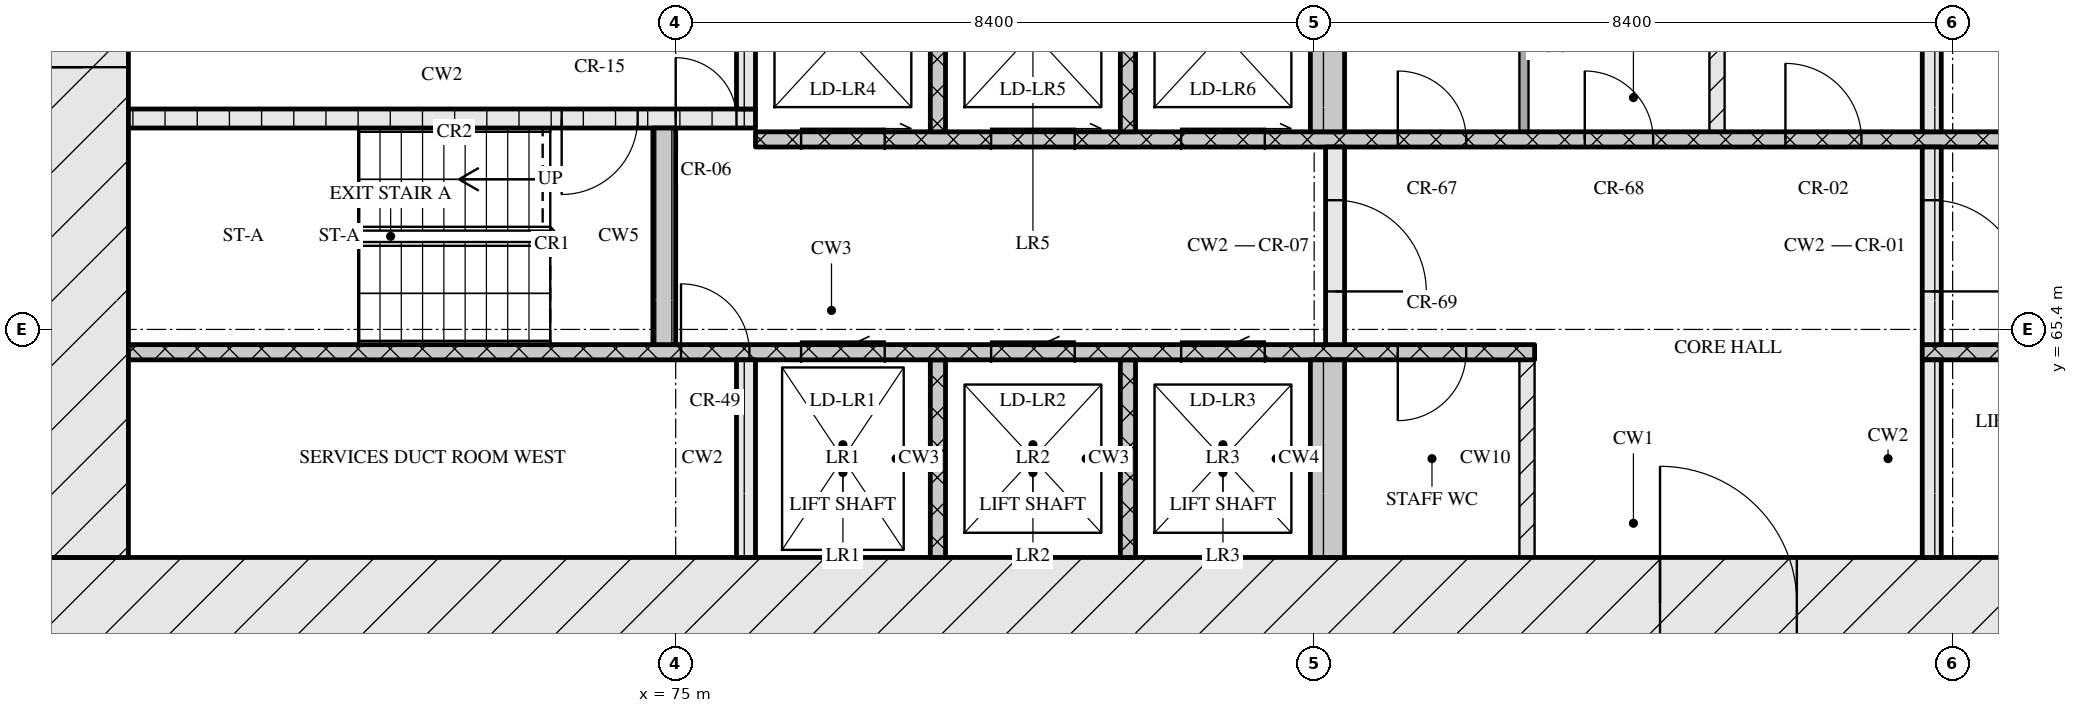
"""IFC4 building model, lengths in metres.
Left out: names, types, materials, properties, quantities, classifications, styles, units other than length and angle.
Written with IfcOpenShell. Run it as: python <this file> out.ifc"""

import sys

from ifc_helpers import new_model, si_unit, direction, frame, frame_2d, origin, place, context, subcontext, project, spatial, rectangle, extrude, element, fill, save


model = new_model("IFC4")
c1 = context("Model", 3, precision=1e-05, world=origin(), true_north=direction((0.0, 1.0)))
c2 = subcontext(c1, "Body", "Model", "MODEL_VIEW")
j1 = project(units=[si_unit("LENGTHUNIT", "METRE"), si_unit("PLANEANGLEUNIT", "RADIAN")], contexts=[c1])
p1 = place(None, origin())
s1 = spatial("IfcSite", under=j1, at=p1, CompositionType="ELEMENT")
p2 = place(p1, origin())
s2 = spatial("IfcBuilding", under=s1, at=p2, CompositionType="ELEMENT")
p3 = place(p2, frame((0.0, 0.0, 62.4)))
s3 = spatial("IfcBuildingStorey", under=s2, at=p3, CompositionType="ELEMENT", Elevation=62.4)
p4 = place(p3, frame((66.6, 61.8, 0.0), z_axis=(0.0, 0.0, 1.0), x_axis=(1.0, 0.0, 0.0)))
e1 = element("IfcWall", 1, at=p4, inside=s3, PredefinedType="SOLIDWALL", context=c2, shape_type="SweptSolid", body=[
    extrude(rectangle(XDim=42.0, YDim=1.2, at=frame_2d((21.0, 0.0))), origin(), (0.0, 0.0, 1.0), 3.32),
])
p5 = place(p4, frame((21.35, 0.0, 0.0)))
e2 = element("IfcOpeningElement", 2, at=p5, cuts=e1, PredefinedType="OPENING", context=c2, shape_type="SweptSolid", body=[
    extrude(rectangle(XDim=1.8, YDim=2.1, at=frame_2d((0.9, 1.05))), frame((0.0, 0.61, 0.0), z_axis=(0.0, -1.0, 0.0), x_axis=(1.0, 0.0, 0.0)), (0.0, 0.0, 1.0), 1.22),
])
p6 = place(p3, frame((67.2, 62.4, 0.0), z_axis=(0.0, 0.0, 1.0), x_axis=(0.0, 1.0, 0.0)))
e3 = element("IfcWall", 3, at=p6, inside=s3, PredefinedType="SOLIDWALL", context=c2, shape_type="SweptSolid", body=[
    extrude(rectangle(XDim=12.0, YDim=1.2, at=frame_2d((6.0, 0.0))), origin(), (0.0, 0.0, 1.0), 3.32),
])
p7 = place(p6, frame((6.45, 0.0, 0.0)))
e4 = element("IfcOpeningElement", 4, at=p7, cuts=e3, PredefinedType="OPENING", context=c2, shape_type="SweptSolid", body=[
    extrude(rectangle(XDim=1.2, YDim=2.1, at=frame_2d((0.6, 1.05))), frame((0.0, 0.61, 0.0), z_axis=(0.0, -1.0, 0.0), x_axis=(1.0, 0.0, 0.0)), (0.0, 0.0, 1.0), 1.22),
])
p8 = place(p3, frame((75.925, 62.4, 0.0), z_axis=(0.0, 0.0, 1.0), x_axis=(0.0, 1.0, 0.0)))
e5 = element("IfcWall", 5, at=p8, inside=s3, PredefinedType="SOLIDWALL", context=c2, shape_type="SweptSolid", body=[
    extrude(rectangle(XDim=2.6, YDim=0.25, at=frame_2d((1.3, 0.0))), origin(), (0.0, 0.0, 1.0), 3.32),
])
for number, where, z_axis, x_axis in (
    (6, (78.45, 62.4, 0.0), (0.0, 0.0, 1.0), (0.0, 1.0, 0.0)),
    (7, (80.95, 62.4, 0.0), (0.0, 0.0, 1.0), (0.0, 1.0, 0.0)),
):
    element("IfcWall", number, at=place(p3, frame(where, z_axis=z_axis, x_axis=x_axis)), inside=s3, PredefinedType="SOLIDWALL", context=c2, shape_type="SweptSolid", body=[
        extrude(rectangle(XDim=2.6, YDim=0.2, at=frame_2d((1.3, 0.0))), origin(), (0.0, 0.0, 1.0), 3.32),
    ])
p9 = place(p3, frame((83.575, 62.4, 0.0), z_axis=(0.0, 0.0, 1.0), x_axis=(0.0, 1.0, 0.0)))
e8 = element("IfcWall", 8, at=p9, inside=s3, PredefinedType="SOLIDWALL", context=c2, shape_type="SweptSolid", body=[
    extrude(rectangle(XDim=2.6, YDim=0.45, at=frame_2d((1.3, 0.0))), origin(), (0.0, 0.0, 1.0), 3.32),
])
p10 = place(p3, frame((86.2, 62.4, 0.0), z_axis=(0.0, 0.0, 1.0), x_axis=(0.0, 1.0, 0.0)))
e9 = element("IfcWall", 9, at=p10, inside=s3, PredefinedType="PARTITIONING", context=c2, shape_type="SweptSolid", body=[
    extrude(rectangle(XDim=2.6, YDim=0.2, at=frame_2d((1.3, 0.0))), origin(), (0.0, 0.0, 1.0), 3.32),
])
p11 = place(p3, frame((91.525, 62.4, 0.0), z_axis=(0.0, 0.0, 1.0), x_axis=(0.0, 1.0, 0.0)))
e10 = element("IfcWall", 10, at=p11, inside=s3, PredefinedType="SOLIDWALL", context=c2, shape_type="SweptSolid", body=[
    extrude(rectangle(XDim=2.6, YDim=0.25, at=frame_2d((1.3, 0.0))), origin(), (0.0, 0.0, 1.0), 3.32),
])
p12 = place(p3, frame((67.8, 65.1, 0.0), z_axis=(0.0, 0.0, 1.0), x_axis=(1.0, 0.0, 0.0)))
e11 = element("IfcWall", 11, at=p12, inside=s3, PredefinedType="SOLIDWALL", context=c2, shape_type="SweptSolid", body=[
    extrude(rectangle(XDim=18.5, YDim=0.2, at=frame_2d((9.25, 0.0))), origin(), (0.0, 0.0, 1.0), 3.32),
])
p13 = place(p12, frame((7.27, 0.0, 0.0)))
e12 = element("IfcOpeningElement", 12, at=p13, cuts=e11, PredefinedType="OPENING", context=c2, shape_type="SweptSolid", body=[
    extrude(rectangle(XDim=0.9, YDim=2.1, at=frame_2d((0.45, 1.05))), frame((0.0, 0.11, 0.0), z_axis=(0.0, -1.0, 0.0), x_axis=(1.0, 0.0, 0.0)), (0.0, 0.0, 1.0), 0.22),
])
p14 = place(p12, frame((8.85, 0.0, 0.0)))
e13 = element("IfcOpeningElement", 13, at=p14, cuts=e11, PredefinedType="OPENING", context=c2, shape_type="SweptSolid", body=[
    extrude(rectangle(XDim=1.1, YDim=2.1, at=frame_2d((0.55, 1.05))), frame((0.0, 0.11, 0.0), z_axis=(0.0, -1.0, 0.0), x_axis=(1.0, 0.0, 0.0)), (0.0, 0.0, 1.0), 0.22),
])
p15 = place(p12, frame((11.35, 0.0, 0.0)))
e14 = element("IfcOpeningElement", 14, at=p15, cuts=e11, PredefinedType="OPENING", context=c2, shape_type="SweptSolid", body=[
    extrude(rectangle(XDim=1.1, YDim=2.1, at=frame_2d((0.55, 1.05))), frame((0.0, 0.11, 0.0), z_axis=(0.0, -1.0, 0.0), x_axis=(1.0, 0.0, 0.0)), (0.0, 0.0, 1.0), 0.22),
])
p16 = place(p12, frame((13.85, 0.0, 0.0)))
e15 = element("IfcOpeningElement", 15, at=p16, cuts=e11, PredefinedType="OPENING", context=c2, shape_type="SweptSolid", body=[
    extrude(rectangle(XDim=1.1, YDim=2.1, at=frame_2d((0.55, 1.05))), frame((0.0, 0.11, 0.0), z_axis=(0.0, -1.0, 0.0), x_axis=(1.0, 0.0, 0.0)), (0.0, 0.0, 1.0), 0.22),
])
p17 = place(p12, frame((16.7, 0.0, 0.0)))
e16 = element("IfcOpeningElement", 16, at=p17, cuts=e11, PredefinedType="OPENING", context=c2, shape_type="SweptSolid", body=[
    extrude(rectangle(XDim=0.9, YDim=2.1, at=frame_2d((0.45, 1.05))), frame((0.0, 0.11, 0.0), z_axis=(0.0, -1.0, 0.0), x_axis=(1.0, 0.0, 0.0)), (0.0, 0.0, 1.0), 0.22),
])
p18 = place(p3, frame((91.4, 65.1, 0.0), z_axis=(0.0, 0.0, 1.0), x_axis=(1.0, 0.0, 0.0)))
e17 = element("IfcWall", 17, at=p18, inside=s3, PredefinedType="SOLIDWALL", context=c2, shape_type="SweptSolid", body=[
    extrude(rectangle(XDim=16.0, YDim=0.2, at=frame_2d((8.0, 0.0))), origin(), (0.0, 0.0, 1.0), 3.32),
])
p19 = place(p18, frame((7.83, 0.0, 0.0)))
e18 = element("IfcOpeningElement", 18, at=p19, cuts=e17, PredefinedType="OPENING", context=c2, shape_type="SweptSolid", body=[
    extrude(rectangle(XDim=0.9, YDim=2.1, at=frame_2d((0.45, 1.05))), frame((0.0, 0.11, 0.0), z_axis=(0.0, -1.0, 0.0), x_axis=(1.0, 0.0, 0.0)), (0.0, 0.0, 1.0), 0.22),
])
p20 = place(p3, frame((74.85, 65.2, 0.0), z_axis=(0.0, 0.0, 1.0), x_axis=(0.0, 1.0, 0.0)))
e19 = element("IfcWall", 19, at=p20, inside=s3, PredefinedType="SOLIDWALL", context=c2, shape_type="SweptSolid", body=[
    extrude(rectangle(XDim=2.85, YDim=0.3, at=frame_2d((1.425, 0.0))), origin(), (0.0, 0.0, 1.0), 3.32),
])
p21 = place(p3, frame((83.675, 65.2, 0.0), z_axis=(0.0, 0.0, 1.0), x_axis=(0.0, 1.0, 0.0)))
e20 = element("IfcWall", 20, at=p21, inside=s3, PredefinedType="SOLIDWALL", context=c2, shape_type="SweptSolid", body=[
    extrude(rectangle(XDim=2.6, YDim=0.25, at=frame_2d((1.3, 0.0))), origin(), (0.0, 0.0, 1.0), 3.32),
])
p22 = place(p21, frame((0.7, 0.0, 0.0)))
e21 = element("IfcOpeningElement", 21, at=p22, cuts=e20, PredefinedType="OPENING", context=c2, shape_type="SweptSolid", body=[
    extrude(rectangle(XDim=1.2, YDim=2.1, at=frame_2d((0.6, 1.05))), frame((0.0, 0.135, 0.0), z_axis=(0.0, -1.0, 0.0), x_axis=(1.0, 0.0, 0.0)), (0.0, 0.0, 1.0), 0.27),
])
p23 = place(p3, frame((91.525, 65.2, 0.0), z_axis=(0.0, 0.0, 1.0), x_axis=(0.0, 1.0, 0.0)))
e22 = element("IfcWall", 22, at=p23, inside=s3, PredefinedType="SOLIDWALL", context=c2, shape_type="SweptSolid", body=[
    extrude(rectangle(XDim=2.6, YDim=0.25, at=frame_2d((1.3, 0.0))), origin(), (0.0, 0.0, 1.0), 3.32),
])
p24 = place(p23, frame((0.7, 0.0, 0.0)))
e23 = element("IfcOpeningElement", 23, at=p24, cuts=e22, PredefinedType="OPENING", context=c2, shape_type="SweptSolid", body=[
    extrude(rectangle(XDim=1.2, YDim=2.1, at=frame_2d((0.6, 1.05))), frame((0.0, 0.135, 0.0), z_axis=(0.0, -1.0, 0.0), x_axis=(1.0, 0.0, 0.0)), (0.0, 0.0, 1.0), 0.27),
])
p25 = place(p3, frame((76.05, 67.9, 0.0), z_axis=(0.0, 0.0, 1.0), x_axis=(1.0, 0.0, 0.0)))
e24 = element("IfcWall", 24, at=p25, inside=s3, PredefinedType="SOLIDWALL", context=c2, shape_type="SweptSolid", body=[
    extrude(rectangle(XDim=23.1, YDim=0.2, at=frame_2d((11.55, 0.0))), origin(), (0.0, 0.0, 1.0), 3.32),
])
p26 = place(p25, frame((0.6, 0.0, 0.0)))
e25 = element("IfcOpeningElement", 25, at=p26, cuts=e24, PredefinedType="OPENING", context=c2, shape_type="SweptSolid", body=[
    extrude(rectangle(XDim=1.1, YDim=2.1, at=frame_2d((0.55, 1.05))), frame((0.0, 0.11, 0.0), z_axis=(0.0, -1.0, 0.0), x_axis=(1.0, 0.0, 0.0)), (0.0, 0.0, 1.0), 0.22),
])
p27 = place(p25, frame((3.1, 0.0, 0.0)))
e26 = element("IfcOpeningElement", 26, at=p27, cuts=e24, PredefinedType="OPENING", context=c2, shape_type="SweptSolid", body=[
    extrude(rectangle(XDim=1.1, YDim=2.1, at=frame_2d((0.55, 1.05))), frame((0.0, 0.11, 0.0), z_axis=(0.0, -1.0, 0.0), x_axis=(1.0, 0.0, 0.0)), (0.0, 0.0, 1.0), 0.22),
])
p28 = place(p25, frame((5.6, 0.0, 0.0)))
e27 = element("IfcOpeningElement", 27, at=p28, cuts=e24, PredefinedType="OPENING", context=c2, shape_type="SweptSolid", body=[
    extrude(rectangle(XDim=1.1, YDim=2.1, at=frame_2d((0.55, 1.05))), frame((0.0, 0.11, 0.0), z_axis=(0.0, -1.0, 0.0), x_axis=(1.0, 0.0, 0.0)), (0.0, 0.0, 1.0), 0.22),
])
p29 = place(p25, frame((8.45, 0.0, 0.0)))
e28 = element("IfcOpeningElement", 28, at=p29, cuts=e24, PredefinedType="OPENING", context=c2, shape_type="SweptSolid", body=[
    extrude(rectangle(XDim=0.9, YDim=2.1, at=frame_2d((0.45, 1.05))), frame((0.0, 0.11, 0.0), z_axis=(0.0, -1.0, 0.0), x_axis=(1.0, 0.0, 0.0)), (0.0, 0.0, 1.0), 0.22),
])
p30 = place(p25, frame((10.91, 0.0, 0.0)))
e29 = element("IfcOpeningElement", 29, at=p30, cuts=e24, PredefinedType="OPENING", context=c2, shape_type="SweptSolid", body=[
    extrude(rectangle(XDim=0.9, YDim=2.1, at=frame_2d((0.45, 1.05))), frame((0.0, 0.11, 0.0), z_axis=(0.0, -1.0, 0.0), x_axis=(1.0, 0.0, 0.0)), (0.0, 0.0, 1.0), 0.22),
])
p31 = place(p25, frame((13.55, 0.0, 0.0)))
e30 = element("IfcOpeningElement", 30, at=p31, cuts=e24, PredefinedType="OPENING", context=c2, shape_type="SweptSolid", body=[
    extrude(rectangle(XDim=1.0, YDim=2.1, at=frame_2d((0.5, 1.05))), frame((0.0, 0.11, 0.0), z_axis=(0.0, -1.0, 0.0), x_axis=(1.0, 0.0, 0.0)), (0.0, 0.0, 1.0), 0.22),
])
for number, where, z_axis, x_axis in (
    (31, (78.45, 68.0, 0.0), (0.0, 0.0, 1.0), (0.0, 1.0, 0.0)),
    (32, (80.95, 68.0, 0.0), (0.0, 0.0, 1.0), (0.0, 1.0, 0.0)),
):
    element("IfcWall", number, at=place(p3, frame(where, z_axis=z_axis, x_axis=x_axis)), inside=s3, PredefinedType="SOLIDWALL", context=c2, shape_type="SweptSolid", body=[
        extrude(rectangle(XDim=2.6, YDim=0.2, at=frame_2d((1.3, 0.0))), origin(), (0.0, 0.0, 1.0), 3.32),
    ])
p32 = place(p3, frame((83.575, 68.0, 0.0), z_axis=(0.0, 0.0, 1.0), x_axis=(0.0, 1.0, 0.0)))
e33 = element("IfcWall", 33, at=p32, inside=s3, PredefinedType="SOLIDWALL", context=c2, shape_type="SweptSolid", body=[
    extrude(rectangle(XDim=2.6, YDim=0.45, at=frame_2d((1.3, 0.0))), origin(), (0.0, 0.0, 1.0), 3.32),
])
p33 = place(p3, frame((86.16, 68.0, 0.0), z_axis=(0.0, 0.0, 1.0), x_axis=(0.0, 1.0, 0.0)))
e34 = element("IfcWall", 34, at=p33, inside=s3, PredefinedType="PARTITIONING", context=c2, shape_type="SweptSolid", body=[
    extrude(rectangle(XDim=2.6, YDim=0.12, at=frame_2d((1.3, 0.0))), origin(), (0.0, 0.0, 1.0), 3.32),
])
p34 = place(p3, frame((88.7, 68.0, 0.0), z_axis=(0.0, 0.0, 1.0), x_axis=(0.0, 1.0, 0.0)))
e35 = element("IfcWall", 35, at=p34, inside=s3, PredefinedType="PARTITIONING", context=c2, shape_type="SweptSolid", body=[
    extrude(rectangle(XDim=2.6, YDim=0.2, at=frame_2d((1.3, 0.0))), origin(), (0.0, 0.0, 1.0), 3.32),
])
p35 = place(p3, frame((91.525, 68.0, 0.0), z_axis=(0.0, 0.0, 1.0), x_axis=(0.0, 1.0, 0.0)))
e36 = element("IfcWall", 36, at=p35, inside=s3, PredefinedType="SOLIDWALL", context=c2, shape_type="SweptSolid", body=[
    extrude(rectangle(XDim=2.6, YDim=0.25, at=frame_2d((1.3, 0.0))), origin(), (0.0, 0.0, 1.0), 3.32),
])
p36 = place(p3, frame((67.8, 68.175, 0.0), z_axis=(0.0, 0.0, 1.0), x_axis=(1.0, 0.0, 0.0)))
e37 = element("IfcWall", 37, at=p36, inside=s3, PredefinedType="SOLIDWALL", context=c2, shape_type="SweptSolid", body=[
    extrude(rectangle(XDim=8.25, YDim=0.25, at=frame_2d((4.125, 0.0))), origin(), (0.0, 0.0, 1.0), 3.32),
])
p37 = place(p36, frame((5.7, 0.0, 0.0)))
e38 = element("IfcOpeningElement", 38, at=p37, cuts=e37, PredefinedType="OPENING", context=c2, shape_type="SweptSolid", body=[
    extrude(rectangle(XDim=1.0, YDim=2.1, at=frame_2d((0.5, 1.05))), frame((0.0, 0.135, 0.0), z_axis=(0.0, -1.0, 0.0), x_axis=(1.0, 0.0, 0.0)), (0.0, 0.0, 1.0), 0.27),
])
p38 = place(p36, frame((7.2, 0.0, 0.0)))
e39 = element("IfcOpeningElement", 39, at=p38, cuts=e37, PredefinedType="OPENING", context=c2, shape_type="SweptSolid", body=[
    extrude(rectangle(XDim=0.8, YDim=2.1, at=frame_2d((0.4, 1.05))), frame((0.0, 0.135, 0.0), z_axis=(0.0, -1.0, 0.0), x_axis=(1.0, 0.0, 0.0)), (0.0, 0.0, 1.0), 0.27),
])
p39 = place(p3, frame((75.925, 68.3, 0.0), z_axis=(0.0, 0.0, 1.0), x_axis=(0.0, 1.0, 0.0)))
e40 = element("IfcWall", 40, at=p39, inside=s3, PredefinedType="SOLIDWALL", context=c2, shape_type="SweptSolid", body=[
    extrude(rectangle(XDim=2.3, YDim=0.25, at=frame_2d((1.15, 0.0))), origin(), (0.0, 0.0, 1.0), 3.32),
])
p40 = place(p5, origin())
e41 = element("IfcDoor", 41, at=p40, inside=s3, OperationType="DOUBLE_DOOR_SINGLE_SWING", PredefinedType="DOOR", context=c2, shape_type="SweptSolid", body=[
    extrude(rectangle(XDim=1.8, YDim=2.1, at=frame_2d((0.9, 1.05))), frame((0.0, 0.025, 0.0), z_axis=(0.0, -1.0, 0.0), x_axis=(1.0, 0.0, 0.0)), (0.0, 0.0, 1.0), 0.05),
])
fill(e2, e41)
p41 = place(p13, origin())
e42 = element("IfcDoor", 42, at=p41, inside=s3, OperationType="SINGLE_SWING_LEFT", PredefinedType="DOOR", context=c2, shape_type="SweptSolid", body=[
    extrude(rectangle(XDim=0.9, YDim=2.1, at=frame_2d((0.45, 1.05))), frame((0.0, 0.025, 0.0), z_axis=(0.0, -1.0, 0.0), x_axis=(1.0, 0.0, 0.0)), (0.0, 0.0, 1.0), 0.05),
])
fill(e12, e42)
p42 = place(p14, origin())
e43 = element("IfcDoor", 43, at=p42, inside=s3, OperationType="SLIDING_TO_LEFT", PredefinedType="DOOR", context=c2, shape_type="SweptSolid", body=[
    extrude(rectangle(XDim=1.1, YDim=2.1, at=frame_2d((0.55, 1.05))), frame((0.0, 0.025, 0.0), z_axis=(0.0, -1.0, 0.0), x_axis=(1.0, 0.0, 0.0)), (0.0, 0.0, 1.0), 0.05),
])
fill(e13, e43)
p43 = place(p15, origin())
e44 = element("IfcDoor", 44, at=p43, inside=s3, OperationType="SLIDING_TO_LEFT", PredefinedType="DOOR", context=c2, shape_type="SweptSolid", body=[
    extrude(rectangle(XDim=1.1, YDim=2.1, at=frame_2d((0.55, 1.05))), frame((0.0, 0.025, 0.0), z_axis=(0.0, -1.0, 0.0), x_axis=(1.0, 0.0, 0.0)), (0.0, 0.0, 1.0), 0.05),
])
fill(e14, e44)
p44 = place(p16, origin())
e45 = element("IfcDoor", 45, at=p44, inside=s3, OperationType="SLIDING_TO_LEFT", PredefinedType="DOOR", context=c2, shape_type="SweptSolid", body=[
    extrude(rectangle(XDim=1.1, YDim=2.1, at=frame_2d((0.55, 1.05))), frame((0.0, 0.025, 0.0), z_axis=(0.0, -1.0, 0.0), x_axis=(1.0, 0.0, 0.0)), (0.0, 0.0, 1.0), 0.05),
])
fill(e15, e45)
p45 = place(p17, origin())
e46 = element("IfcDoor", 46, at=p45, inside=s3, OperationType="SINGLE_SWING_RIGHT", PredefinedType="DOOR", context=c2, shape_type="SweptSolid", body=[
    extrude(rectangle(XDim=0.9, YDim=2.1, at=frame_2d((0.45, 1.05))), frame((0.0, 0.025, 0.0), z_axis=(0.0, -1.0, 0.0), x_axis=(1.0, 0.0, 0.0)), (0.0, 0.0, 1.0), 0.05),
])
fill(e16, e46)
p46 = place(p22, origin())
e47 = element("IfcDoor", 47, at=p46, inside=s3, OperationType="SINGLE_SWING_RIGHT", PredefinedType="DOOR", context=c2, shape_type="SweptSolid", body=[
    extrude(rectangle(XDim=1.2, YDim=2.1, at=frame_2d((0.6, 1.05))), frame((0.0, 0.025, 0.0), z_axis=(0.0, -1.0, 0.0), x_axis=(1.0, 0.0, 0.0)), (0.0, 0.0, 1.0), 0.05),
])
fill(e21, e47)
p47 = place(p24, origin())
e48 = element("IfcDoor", 48, at=p47, inside=s3, OperationType="SINGLE_SWING_RIGHT", PredefinedType="DOOR", context=c2, shape_type="SweptSolid", body=[
    extrude(rectangle(XDim=1.2, YDim=2.1, at=frame_2d((0.6, 1.05))), frame((0.0, 0.025, 0.0), z_axis=(0.0, -1.0, 0.0), x_axis=(1.0, 0.0, 0.0)), (0.0, 0.0, 1.0), 0.05),
])
fill(e23, e48)
p48 = place(p26, origin())
e49 = element("IfcDoor", 49, at=p48, inside=s3, OperationType="SLIDING_TO_RIGHT", PredefinedType="DOOR", context=c2, shape_type="SweptSolid", body=[
    extrude(rectangle(XDim=1.1, YDim=2.1, at=frame_2d((0.55, 1.05))), frame((0.0, 0.025, 0.0), z_axis=(0.0, -1.0, 0.0), x_axis=(1.0, 0.0, 0.0)), (0.0, 0.0, 1.0), 0.05),
])
fill(e25, e49)
p49 = place(p27, origin())
e50 = element("IfcDoor", 50, at=p49, inside=s3, OperationType="SLIDING_TO_RIGHT", PredefinedType="DOOR", context=c2, shape_type="SweptSolid", body=[
    extrude(rectangle(XDim=1.1, YDim=2.1, at=frame_2d((0.55, 1.05))), frame((0.0, 0.025, 0.0), z_axis=(0.0, -1.0, 0.0), x_axis=(1.0, 0.0, 0.0)), (0.0, 0.0, 1.0), 0.05),
])
fill(e26, e50)
p50 = place(p28, origin())
e51 = element("IfcDoor", 51, at=p50, inside=s3, OperationType="SLIDING_TO_RIGHT", PredefinedType="DOOR", context=c2, shape_type="SweptSolid", body=[
    extrude(rectangle(XDim=1.1, YDim=2.1, at=frame_2d((0.55, 1.05))), frame((0.0, 0.025, 0.0), z_axis=(0.0, -1.0, 0.0), x_axis=(1.0, 0.0, 0.0)), (0.0, 0.0, 1.0), 0.05),
])
fill(e27, e51)
p51 = place(p29, origin())
e52 = element("IfcDoor", 52, at=p51, inside=s3, OperationType="SINGLE_SWING_LEFT", PredefinedType="DOOR", context=c2, shape_type="SweptSolid", body=[
    extrude(rectangle(XDim=0.9, YDim=2.1, at=frame_2d((0.45, 1.05))), frame((0.0, 0.025, 0.0), z_axis=(0.0, -1.0, 0.0), x_axis=(1.0, 0.0, 0.0)), (0.0, 0.0, 1.0), 0.05),
])
fill(e28, e52)
p52 = place(p30, origin())
e53 = element("IfcDoor", 53, at=p52, inside=s3, OperationType="SINGLE_SWING_LEFT", PredefinedType="DOOR", context=c2, shape_type="SweptSolid", body=[
    extrude(rectangle(XDim=0.9, YDim=2.1, at=frame_2d((0.45, 1.05))), frame((0.0, 0.025, 0.0), z_axis=(0.0, -1.0, 0.0), x_axis=(1.0, 0.0, 0.0)), (0.0, 0.0, 1.0), 0.05),
])
fill(e29, e53)
p53 = place(p31, origin())
e54 = element("IfcDoor", 54, at=p53, inside=s3, OperationType="SINGLE_SWING_LEFT", PredefinedType="DOOR", context=c2, shape_type="SweptSolid", body=[
    extrude(rectangle(XDim=1.0, YDim=2.1, at=frame_2d((0.5, 1.05))), frame((0.0, 0.025, 0.0), z_axis=(0.0, -1.0, 0.0), x_axis=(1.0, 0.0, 0.0)), (0.0, 0.0, 1.0), 0.05),
])
fill(e30, e54)
p54 = place(p37, origin())
e55 = element("IfcDoor", 55, at=p54, inside=s3, OperationType="SINGLE_SWING_RIGHT", PredefinedType="DOOR", context=c2, shape_type="SweptSolid", body=[
    extrude(rectangle(XDim=1.0, YDim=2.1, at=frame_2d((0.5, 1.05))), frame((0.0, 0.025, 0.0), z_axis=(0.0, -1.0, 0.0), x_axis=(1.0, 0.0, 0.0)), (0.0, 0.0, 1.0), 0.05),
])
fill(e38, e55)
p55 = place(p38, origin())
e56 = element("IfcDoor", 56, at=p55, inside=s3, OperationType="SINGLE_SWING_LEFT", PredefinedType="DOOR", context=c2, shape_type="SweptSolid", body=[
    extrude(rectangle(XDim=0.8, YDim=2.1, at=frame_2d((0.4, 1.05))), frame((0.0, 0.025, 0.0), z_axis=(0.0, -1.0, 0.0), x_axis=(1.0, 0.0, 0.0)), (0.0, 0.0, 1.0), 0.05),
])
fill(e39, e56)
p56 = place(p7, origin())
e57 = element("IfcDoor", 57, at=p56, inside=s3, OperationType="SINGLE_SWING_LEFT", PredefinedType="DOOR", context=c2, shape_type="SweptSolid", body=[
    extrude(rectangle(XDim=1.2, YDim=2.1, at=frame_2d((0.6, 1.05))), frame((0.0, 0.025, 0.0), z_axis=(0.0, -1.0, 0.0), x_axis=(1.0, 0.0, 0.0)), (0.0, 0.0, 1.0), 0.05),
])
fill(e4, e57)
save(model, sys.argv[1])
